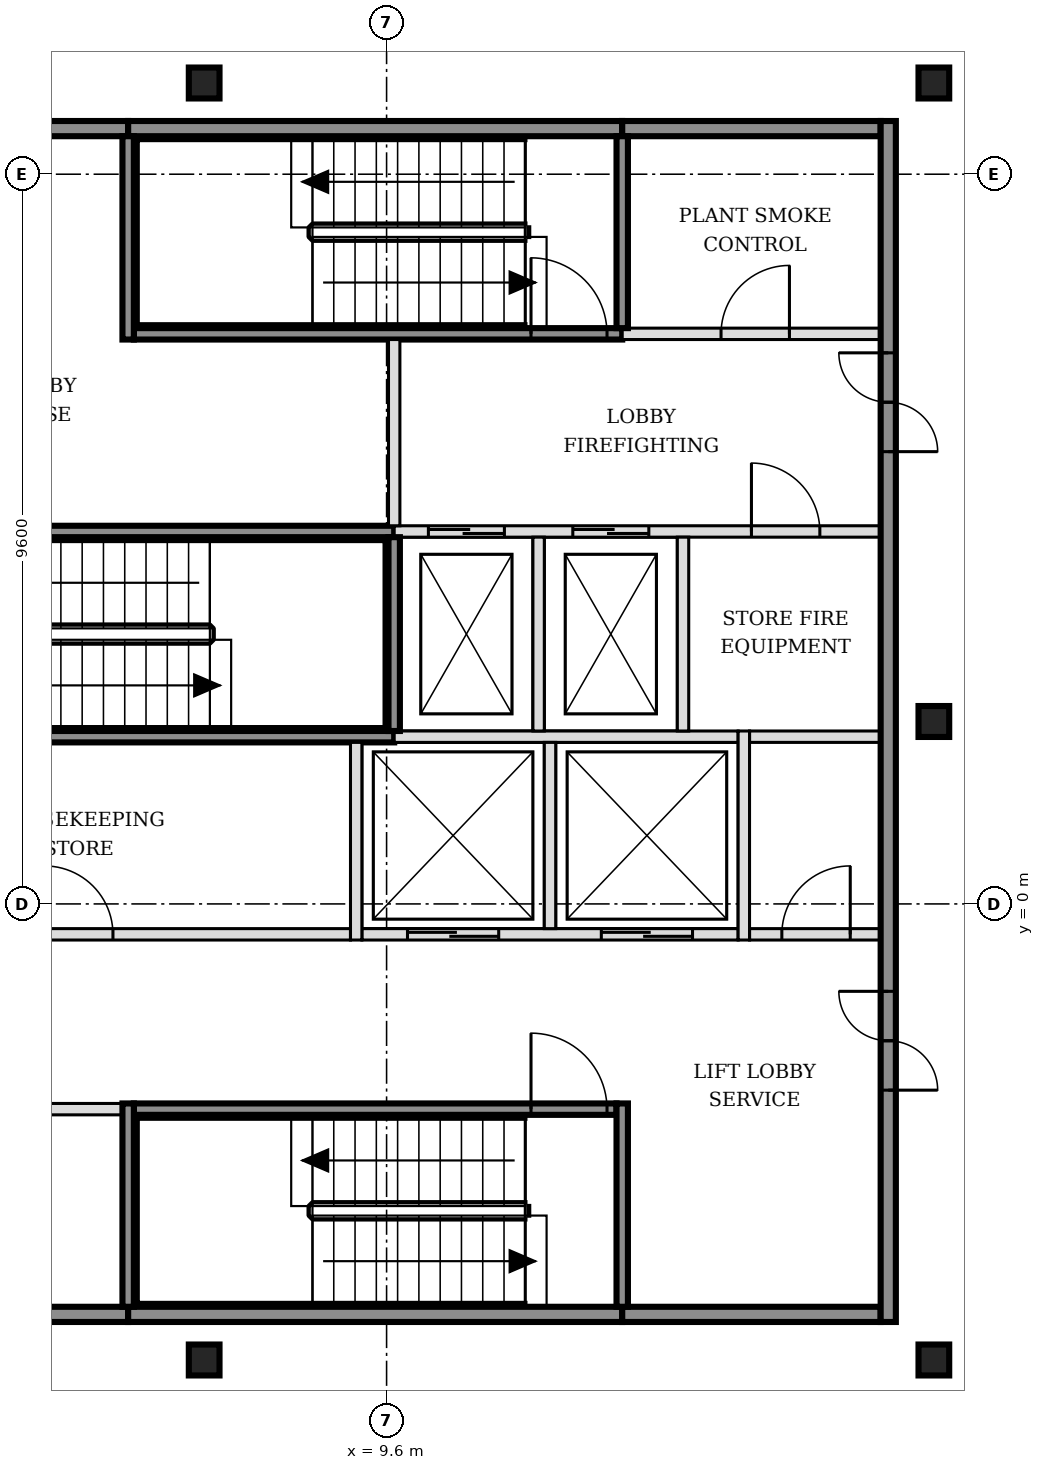
"""IFC4 building model, lengths in metres.
Left out: names, types, materials, properties, quantities, classifications, styles, units other than length and angle.
Written with IfcOpenShell. Run it as: python <this file> out.ifc"""

import sys

from ifc_helpers import new_model, si_unit, direction, frame, frame_2d, origin, origin_2d, place, context, subcontext, project, spatial, rectangle, i_section, extrude, element, fill, save


model = new_model("IFC4")
c1 = context("Model", 3, precision=1e-05, world=origin(), true_north=direction((0.0, 1.0)))
c2 = subcontext(c1, "Body", "Model", "MODEL_VIEW")
j1 = project(units=[si_unit("LENGTHUNIT", "METRE"), si_unit("PLANEANGLEUNIT", "RADIAN")], contexts=[c1])
p1 = place(None, origin())
s1 = spatial("IfcSite", under=j1, at=p1, CompositionType="ELEMENT")
p2 = place(p1, origin())
s2 = spatial("IfcBuilding", under=s1, at=p2, CompositionType="ELEMENT")
p3 = place(p2, frame((0.0, 0.0, 214.2)))
s3 = spatial("IfcBuildingStorey", under=s2, at=p3, CompositionType="ELEMENT", Elevation=214.2)
for number, where, z_axis, x_axis in (
    (1, (7.2, -6.0, -0.15), (0.0, 0.0, 1.0), (1.0, 0.0, 0.0)),
    (2, (16.8, -6.0, -0.15), (0.0, 0.0, 1.0), (1.0, 0.0, 0.0)),
    (3, (16.8, 2.4, -0.15), (0.0, 0.0, 1.0), (1.0, 0.0, 0.0)),
    (4, (7.2, 10.8, -0.15), (0.0, 0.0, 1.0), (1.0, 0.0, 0.0)),
    (5, (16.8, 10.8, -0.15), (0.0, 0.0, 1.0), (1.0, 0.0, 0.0)),
):
    element("IfcColumn", number, at=place(p3, frame(where, z_axis=z_axis, x_axis=x_axis)), inside=s3, PredefinedType="COLUMN", context=c2, shape_type="SweptSolid", body=[
        extrude(i_section(OverallWidth=0.404, OverallDepth=0.407, WebThickness=0.027, FlangeThickness=0.044, FilletRadius=0.015, at=origin_2d()), origin(), (0.0, 0.0, 1.0), 3.6),
    ])
p4 = place(p3, frame((-1.7, -5.4, 0.0), z_axis=(0.0, 0.0, 1.0), x_axis=(1.0, 0.0, 0.0)))
e6 = element("IfcWall", 6, at=p4, inside=s3, PredefinedType="SOLIDWALL", context=c2, shape_type="SweptSolid", body=[
    extrude(rectangle(XDim=7.9, YDim=0.2, at=frame_2d((3.95, 0.0))), origin(), (0.0, 0.0, 1.0), 3.45),
])
p5 = place(p3, frame((6.2, -5.4, 0.0), z_axis=(0.0, 0.0, 1.0), x_axis=(1.0, 0.0, 0.0)))
e7 = element("IfcWall", 7, at=p5, inside=s3, PredefinedType="SOLIDWALL", context=c2, shape_type="SweptSolid", body=[
    extrude(rectangle(XDim=6.5, YDim=0.2, at=frame_2d((3.25, 0.0))), origin(), (0.0, 0.0, 1.0), 3.45),
])
p6 = place(p3, frame((12.7, -5.4, 0.0), z_axis=(0.0, 0.0, 1.0), x_axis=(1.0, 0.0, 0.0)))
e8 = element("IfcWall", 8, at=p6, inside=s3, PredefinedType="SOLIDWALL", context=c2, shape_type="SweptSolid", body=[
    extrude(rectangle(XDim=3.4, YDim=0.2, at=frame_2d((1.7, 0.0))), origin(), (0.0, 0.0, 1.0), 3.45),
])
p7 = place(p3, frame((-1.7, -2.7, 0.0), z_axis=(0.0, 0.0, 1.0), x_axis=(1.0, 0.0, 0.0)))
e9 = element("IfcWall", 9, at=p7, inside=s3, PredefinedType="PARTITIONING", context=c2, shape_type="SweptSolid", body=[
    extrude(rectangle(XDim=7.825, YDim=0.15, at=frame_2d((3.913, 0.0))), origin(), (0.0, 0.0, 1.0), 3.45),
])
p8 = place(p7, frame((3.45, 0.0, 0.0)))
e10 = element("IfcOpeningElement", 10, at=p8, cuts=e9, PredefinedType="OPENING", context=c2, shape_type="SweptSolid", body=[
    extrude(rectangle(XDim=0.9, YDim=2.1, at=frame_2d((0.45, 1.05))), frame((0.0, 0.085, 0.0), z_axis=(0.0, -1.0, 0.0), x_axis=(1.0, 0.0, 0.0)), (0.0, 0.0, 1.0), 0.17),
])
p9 = place(p3, frame((6.275, -2.7, 0.0), z_axis=(0.0, 0.0, 1.0), x_axis=(1.0, 0.0, 0.0)))
e11 = element("IfcWall", 11, at=p9, inside=s3, PredefinedType="SOLIDWALL", context=c2, shape_type="SweptSolid", body=[
    extrude(rectangle(XDim=6.35, YDim=0.15, at=frame_2d((3.175, 0.0))), origin(), (0.0, 0.0, 1.0), 3.45),
])
p10 = place(p9, frame((5.225, 0.0, 0.0)))
e12 = element("IfcOpeningElement", 12, at=p10, cuts=e11, PredefinedType="OPENING", context=c2, shape_type="SweptSolid", body=[
    extrude(rectangle(XDim=1.0, YDim=2.1, at=frame_2d((0.5, 1.05))), frame((0.0, 0.085, 0.0), z_axis=(0.0, -1.0, 0.0), x_axis=(1.0, 0.0, 0.0)), (0.0, 0.0, 1.0), 0.17),
])
p11 = place(p3, frame((-1.7, -0.4, 0.0), z_axis=(0.0, 0.0, 1.0), x_axis=(1.0, 0.0, 0.0)))
e13 = element("IfcWall", 13, at=p11, inside=s3, PredefinedType="PARTITIONING", context=c2, shape_type="SweptSolid", body=[
    extrude(rectangle(XDim=10.825, YDim=0.15, at=frame_2d((5.413, 0.0))), origin(), (0.0, 0.0, 1.0), 3.45),
])
p12 = place(p11, frame((1.3, 0.0, 0.0)))
e14 = element("IfcOpeningElement", 14, at=p12, cuts=e13, PredefinedType="OPENING", context=c2, shape_type="SweptSolid", body=[
    extrude(rectangle(XDim=0.9, YDim=2.1, at=frame_2d((0.45, 1.05))), frame((0.0, 0.085, 0.0), z_axis=(0.0, -1.0, 0.0), x_axis=(1.0, 0.0, 0.0)), (0.0, 0.0, 1.0), 0.17),
])
p13 = place(p11, frame((6.8, 0.0, 0.0)))
e15 = element("IfcOpeningElement", 15, at=p13, cuts=e13, PredefinedType="OPENING", context=c2, shape_type="SweptSolid", body=[
    extrude(rectangle(XDim=0.9, YDim=2.1, at=frame_2d((0.45, 1.05))), frame((0.0, 0.085, 0.0), z_axis=(0.0, -1.0, 0.0), x_axis=(1.0, 0.0, 0.0)), (0.0, 0.0, 1.0), 0.17),
])
p14 = place(p3, frame((9.275, -0.4, 0.0), z_axis=(0.0, 0.0, 1.0), x_axis=(1.0, 0.0, 0.0)))
e16 = element("IfcWall", 16, at=p14, inside=s3, PredefinedType="SOLIDWALL", context=c2, shape_type="SweptSolid", body=[
    extrude(rectangle(XDim=4.95, YDim=0.15, at=frame_2d((2.475, 0.0))), origin(), (0.0, 0.0, 1.0), 3.45),
])
p15 = place(p14, frame((0.6, 0.0, 0.0)))
e17 = element("IfcOpeningElement", 17, at=p15, cuts=e16, PredefinedType="OPENING", context=c2, shape_type="SweptSolid", body=[
    extrude(rectangle(XDim=1.2, YDim=2.1, at=frame_2d((0.6, 1.05))), frame((0.0, 0.085, 0.0), z_axis=(0.0, -1.0, 0.0), x_axis=(1.0, 0.0, 0.0)), (0.0, 0.0, 1.0), 0.17),
])
p16 = place(p14, frame((3.15, 0.0, 0.0)))
e18 = element("IfcOpeningElement", 18, at=p16, cuts=e16, PredefinedType="OPENING", context=c2, shape_type="SweptSolid", body=[
    extrude(rectangle(XDim=1.2, YDim=2.1, at=frame_2d((0.6, 1.05))), frame((0.0, 0.085, 0.0), z_axis=(0.0, -1.0, 0.0), x_axis=(1.0, 0.0, 0.0)), (0.0, 0.0, 1.0), 0.17),
])
p17 = place(p3, frame((14.375, -0.4, 0.0), z_axis=(0.0, 0.0, 1.0), x_axis=(1.0, 0.0, 0.0)))
e19 = element("IfcWall", 19, at=p17, inside=s3, PredefinedType="PARTITIONING", context=c2, shape_type="SweptSolid", body=[
    extrude(rectangle(XDim=1.725, YDim=0.15, at=frame_2d((0.863, 0.0))), origin(), (0.0, 0.0, 1.0), 3.45),
])
p18 = place(p17, frame((0.425, 0.0, 0.0)))
e20 = element("IfcOpeningElement", 20, at=p18, cuts=e19, PredefinedType="OPENING", context=c2, shape_type="SweptSolid", body=[
    extrude(rectangle(XDim=0.9, YDim=2.1, at=frame_2d((0.45, 1.05))), frame((0.0, 0.085, 0.0), z_axis=(0.0, -1.0, 0.0), x_axis=(1.0, 0.0, 0.0)), (0.0, 0.0, 1.0), 0.17),
])
p19 = place(p3, frame((3.2, 2.2, 0.0), z_axis=(0.0, 0.0, 1.0), x_axis=(1.0, 0.0, 0.0)))
e21 = element("IfcWall", 21, at=p19, inside=s3, PredefinedType="SOLIDWALL", context=c2, shape_type="SweptSolid", body=[
    extrude(rectangle(XDim=6.5, YDim=0.15, at=frame_2d((3.25, 0.0))), origin(), (0.0, 0.0, 1.0), 3.45),
])
p20 = place(p3, frame((9.7, 2.2, 0.0), z_axis=(0.0, 0.0, 1.0), x_axis=(1.0, 0.0, 0.0)))
e22 = element("IfcWall", 22, at=p20, inside=s3, PredefinedType="SOLIDWALL", context=c2, shape_type="SweptSolid", body=[
    extrude(rectangle(XDim=4.525, YDim=0.15, at=frame_2d((2.263, 0.0))), origin(), (0.0, 0.0, 1.0), 3.45),
])
p21 = place(p3, frame((14.375, 2.2, 0.0), z_axis=(0.0, 0.0, 1.0), x_axis=(1.0, 0.0, 0.0)))
e23 = element("IfcWall", 23, at=p21, inside=s3, PredefinedType="PARTITIONING", context=c2, shape_type="SweptSolid", body=[
    extrude(rectangle(XDim=1.725, YDim=0.15, at=frame_2d((0.863, 0.0))), origin(), (0.0, 0.0, 1.0), 3.45),
])
p22 = place(p3, frame((3.2, 4.9, 0.0), z_axis=(0.0, 0.0, 1.0), x_axis=(1.0, 0.0, 0.0)))
e24 = element("IfcWall", 24, at=p22, inside=s3, PredefinedType="SOLIDWALL", context=c2, shape_type="SweptSolid", body=[
    extrude(rectangle(XDim=6.5, YDim=0.15, at=frame_2d((3.25, 0.0))), origin(), (0.0, 0.0, 1.0), 3.45),
])
p23 = place(p22, frame((0.175, 0.0, 0.0)))
e25 = element("IfcOpeningElement", 25, at=p23, cuts=e24, PredefinedType="OPENING", context=c2, shape_type="SweptSolid", body=[
    extrude(rectangle(XDim=1.0, YDim=2.1, at=frame_2d((0.5, 1.05))), frame((0.0, 0.085, 0.0), z_axis=(0.0, -1.0, 0.0), x_axis=(1.0, 0.0, 0.0)), (0.0, 0.0, 1.0), 0.17),
])
p24 = place(p3, frame((9.7, 4.9, 0.0), z_axis=(0.0, 0.0, 1.0), x_axis=(1.0, 0.0, 0.0)))
e26 = element("IfcWall", 26, at=p24, inside=s3, PredefinedType="SOLIDWALL", context=c2, shape_type="SweptSolid", body=[
    extrude(rectangle(XDim=6.4, YDim=0.15, at=frame_2d((3.2, 0.0))), origin(), (0.0, 0.0, 1.0), 3.45),
])
p25 = place(p24, frame((0.45, 0.0, 0.0)))
e27 = element("IfcOpeningElement", 27, at=p25, cuts=e26, PredefinedType="OPENING", context=c2, shape_type="SweptSolid", body=[
    extrude(rectangle(XDim=1.0, YDim=2.1, at=frame_2d((0.5, 1.05))), frame((0.0, 0.085, 0.0), z_axis=(0.0, -1.0, 0.0), x_axis=(1.0, 0.0, 0.0)), (0.0, 0.0, 1.0), 0.17),
])
p26 = place(p24, frame((2.35, 0.0, 0.0)))
e28 = element("IfcOpeningElement", 28, at=p26, cuts=e26, PredefinedType="OPENING", context=c2, shape_type="SweptSolid", body=[
    extrude(rectangle(XDim=1.0, YDim=2.1, at=frame_2d((0.5, 1.05))), frame((0.0, 0.085, 0.0), z_axis=(0.0, -1.0, 0.0), x_axis=(1.0, 0.0, 0.0)), (0.0, 0.0, 1.0), 0.17),
])
p27 = place(p24, frame((4.7, 0.0, 0.0)))
e29 = element("IfcOpeningElement", 29, at=p27, cuts=e26, PredefinedType="OPENING", context=c2, shape_type="SweptSolid", body=[
    extrude(rectangle(XDim=0.9, YDim=2.1, at=frame_2d((0.45, 1.05))), frame((0.0, 0.085, 0.0), z_axis=(0.0, -1.0, 0.0), x_axis=(1.0, 0.0, 0.0)), (0.0, 0.0, 1.0), 0.17),
])
p28 = place(p3, frame((6.275, 7.5, 0.0), z_axis=(0.0, 0.0, 1.0), x_axis=(1.0, 0.0, 0.0)))
e30 = element("IfcWall", 30, at=p28, inside=s3, PredefinedType="SOLIDWALL", context=c2, shape_type="SweptSolid", body=[
    extrude(rectangle(XDim=6.425, YDim=0.15, at=frame_2d((3.212, 0.0))), origin(), (0.0, 0.0, 1.0), 3.45),
])
p29 = place(p28, frame((5.225, 0.0, 0.0)))
e31 = element("IfcOpeningElement", 31, at=p29, cuts=e30, PredefinedType="OPENING", context=c2, shape_type="SweptSolid", body=[
    extrude(rectangle(XDim=1.0, YDim=2.1, at=frame_2d((0.5, 1.05))), frame((0.0, 0.085, 0.0), z_axis=(0.0, -1.0, 0.0), x_axis=(1.0, 0.0, 0.0)), (0.0, 0.0, 1.0), 0.17),
])
p30 = place(p3, frame((12.7, 7.5, 0.0), z_axis=(0.0, 0.0, 1.0), x_axis=(1.0, 0.0, 0.0)))
e32 = element("IfcWall", 32, at=p30, inside=s3, PredefinedType="SOLIDWALL", context=c2, shape_type="SweptSolid", body=[
    extrude(rectangle(XDim=3.4, YDim=0.15, at=frame_2d((1.7, 0.0))), origin(), (0.0, 0.0, 1.0), 3.45),
])
p31 = place(p30, frame((1.3, 0.0, 0.0)))
e33 = element("IfcOpeningElement", 33, at=p31, cuts=e32, PredefinedType="OPENING", context=c2, shape_type="SweptSolid", body=[
    extrude(rectangle(XDim=0.9, YDim=2.1, at=frame_2d((0.45, 1.05))), frame((0.0, 0.085, 0.0), z_axis=(0.0, -1.0, 0.0), x_axis=(1.0, 0.0, 0.0)), (0.0, 0.0, 1.0), 0.17),
])
p32 = place(p3, frame((-1.7, 10.2, 0.0), z_axis=(0.0, 0.0, 1.0), x_axis=(1.0, 0.0, 0.0)))
e34 = element("IfcWall", 34, at=p32, inside=s3, PredefinedType="SOLIDWALL", context=c2, shape_type="SweptSolid", body=[
    extrude(rectangle(XDim=7.9, YDim=0.2, at=frame_2d((3.95, 0.0))), origin(), (0.0, 0.0, 1.0), 3.45),
])
p33 = place(p3, frame((6.2, 10.2, 0.0), z_axis=(0.0, 0.0, 1.0), x_axis=(1.0, 0.0, 0.0)))
e35 = element("IfcWall", 35, at=p33, inside=s3, PredefinedType="SOLIDWALL", context=c2, shape_type="SweptSolid", body=[
    extrude(rectangle(XDim=6.5, YDim=0.2, at=frame_2d((3.25, 0.0))), origin(), (0.0, 0.0, 1.0), 3.45),
])
p34 = place(p3, frame((12.7, 10.2, 0.0), z_axis=(0.0, 0.0, 1.0), x_axis=(1.0, 0.0, 0.0)))
e36 = element("IfcWall", 36, at=p34, inside=s3, PredefinedType="SOLIDWALL", context=c2, shape_type="SweptSolid", body=[
    extrude(rectangle(XDim=3.4, YDim=0.2, at=frame_2d((1.7, 0.0))), origin(), (0.0, 0.0, 1.0), 3.45),
])
for number, where, z_axis, x_axis in (
    (37, (6.2, -5.3, 0.0), (0.0, 0.0, 1.0), (0.0, 1.0, 0.0)),
    (38, (6.2, 7.425, 0.0), (0.0, 0.0, 1.0), (0.0, 1.0, 0.0)),
):
    element("IfcWall", number, at=place(p3, frame(where, z_axis=z_axis, x_axis=x_axis)), inside=s3, PredefinedType="SOLIDWALL", context=c2, shape_type="SweptSolid", body=[
        extrude(rectangle(XDim=2.675, YDim=0.15, at=frame_2d((1.337, 0.0))), origin(), (0.0, 0.0, 1.0), 3.45),
    ])
p35 = place(p3, frame((9.2, -0.475, 0.0), z_axis=(0.0, 0.0, 1.0), x_axis=(0.0, 1.0, 0.0)))
e39 = element("IfcWall", 39, at=p35, inside=s3, PredefinedType="SOLIDWALL", context=c2, shape_type="SweptSolid", body=[
    extrude(rectangle(XDim=2.6, YDim=0.15, at=frame_2d((1.3, 0.0))), origin(), (0.0, 0.0, 1.0), 3.45),
])
p36 = place(p3, frame((9.7, 2.275, 0.0), z_axis=(0.0, 0.0, 1.0), x_axis=(0.0, 1.0, 0.0)))
e40 = element("IfcWall", 40, at=p36, inside=s3, PredefinedType="SOLIDWALL", context=c2, shape_type="SweptSolid", body=[
    extrude(rectangle(XDim=2.55, YDim=0.15, at=frame_2d((1.275, 0.0))), origin(), (0.0, 0.0, 1.0), 3.45),
])
p37 = place(p3, frame((9.7, 4.975, 0.0), z_axis=(0.0, 0.0, 1.0), x_axis=(0.0, 1.0, 0.0)))
e41 = element("IfcWall", 41, at=p37, inside=s3, PredefinedType="SOLIDWALL", context=c2, shape_type="SweptSolid", body=[
    extrude(rectangle(XDim=2.45, YDim=0.15, at=frame_2d((1.225, 0.0))), origin(), (0.0, 0.0, 1.0), 3.45),
])
p38 = place(p3, frame((11.6, 2.275, 0.0), z_axis=(0.0, 0.0, 1.0), x_axis=(0.0, 1.0, 0.0)))
e42 = element("IfcWall", 42, at=p38, inside=s3, PredefinedType="SOLIDWALL", context=c2, shape_type="SweptSolid", body=[
    extrude(rectangle(XDim=2.55, YDim=0.15, at=frame_2d((1.275, 0.0))), origin(), (0.0, 0.0, 1.0), 3.45),
])
p39 = place(p3, frame((11.75, -0.325, 0.0), z_axis=(0.0, 0.0, 1.0), x_axis=(0.0, 1.0, 0.0)))
e43 = element("IfcWall", 43, at=p39, inside=s3, PredefinedType="SOLIDWALL", context=c2, shape_type="SweptSolid", body=[
    extrude(rectangle(XDim=2.45, YDim=0.15, at=frame_2d((1.225, 0.0))), origin(), (0.0, 0.0, 1.0), 3.45),
])
p40 = place(p3, frame((12.7, -5.3, 0.0), z_axis=(0.0, 0.0, 1.0), x_axis=(0.0, 1.0, 0.0)))
e44 = element("IfcWall", 44, at=p40, inside=s3, PredefinedType="SOLIDWALL", context=c2, shape_type="SweptSolid", body=[
    extrude(rectangle(XDim=2.675, YDim=0.15, at=frame_2d((1.337, 0.0))), origin(), (0.0, 0.0, 1.0), 3.45),
])
p41 = place(p3, frame((12.7, 7.575, 0.0), z_axis=(0.0, 0.0, 1.0), x_axis=(0.0, 1.0, 0.0)))
e45 = element("IfcWall", 45, at=p41, inside=s3, PredefinedType="SOLIDWALL", context=c2, shape_type="SweptSolid", body=[
    extrude(rectangle(XDim=2.525, YDim=0.15, at=frame_2d((1.263, 0.0))), origin(), (0.0, 0.0, 1.0), 3.45),
])
p42 = place(p3, frame((13.5, 2.275, 0.0), z_axis=(0.0, 0.0, 1.0), x_axis=(0.0, 1.0, 0.0)))
e46 = element("IfcWall", 46, at=p42, inside=s3, PredefinedType="SOLIDWALL", context=c2, shape_type="SweptSolid", body=[
    extrude(rectangle(XDim=2.55, YDim=0.15, at=frame_2d((1.275, 0.0))), origin(), (0.0, 0.0, 1.0), 3.45),
])
p43 = place(p3, frame((14.3, -0.475, 0.0), z_axis=(0.0, 0.0, 1.0), x_axis=(0.0, 1.0, 0.0)))
e47 = element("IfcWall", 47, at=p43, inside=s3, PredefinedType="SOLIDWALL", context=c2, shape_type="SweptSolid", body=[
    extrude(rectangle(XDim=2.75, YDim=0.15, at=frame_2d((1.375, 0.0))), origin(), (0.0, 0.0, 1.0), 3.45),
])
p44 = place(p3, frame((16.2, -5.5, 0.0), z_axis=(0.0, 0.0, 1.0), x_axis=(0.0, 1.0, 0.0)))
e48 = element("IfcWall", 48, at=p44, inside=s3, PredefinedType="SOLIDWALL", context=c2, shape_type="SweptSolid", body=[
    extrude(rectangle(XDim=15.8, YDim=0.2, at=frame_2d((7.9, 0.0))), origin(), (0.0, 0.0, 1.0), 3.45),
])
p45 = place(p44, frame((3.05, 0.0, 0.0)))
e49 = element("IfcOpeningElement", 49, at=p45, cuts=e48, PredefinedType="OPENING", context=c2, shape_type="SweptSolid", body=[
    extrude(rectangle(XDim=1.3, YDim=2.1, at=frame_2d((0.65, 1.05))), frame((0.0, 0.11, 0.0), z_axis=(0.0, -1.0, 0.0), x_axis=(1.0, 0.0, 0.0)), (0.0, 0.0, 1.0), 0.22),
])
p46 = place(p44, frame((11.45, 0.0, 0.0)))
e50 = element("IfcOpeningElement", 50, at=p46, cuts=e48, PredefinedType="OPENING", context=c2, shape_type="SweptSolid", body=[
    extrude(rectangle(XDim=1.3, YDim=2.1, at=frame_2d((0.65, 1.05))), frame((0.0, 0.11, 0.0), z_axis=(0.0, -1.0, 0.0), x_axis=(1.0, 0.0, 0.0)), (0.0, 0.0, 1.0), 0.22),
])
p47 = place(p15, origin())
e51 = element("IfcDoor", 51, at=p47, inside=s3, OperationType="DOUBLE_DOOR_SLIDING", PredefinedType="DOOR", context=c2, shape_type="SweptSolid", body=[
    extrude(rectangle(XDim=1.2, YDim=2.1, at=frame_2d((0.6, 1.05))), frame((0.0, 0.025, 0.0), z_axis=(0.0, -1.0, 0.0), x_axis=(1.0, 0.0, 0.0)), (0.0, 0.0, 1.0), 0.05),
])
fill(e17, e51)
p48 = place(p16, origin())
e52 = element("IfcDoor", 52, at=p48, inside=s3, OperationType="DOUBLE_DOOR_SLIDING", PredefinedType="DOOR", context=c2, shape_type="SweptSolid", body=[
    extrude(rectangle(XDim=1.2, YDim=2.1, at=frame_2d((0.6, 1.05))), frame((0.0, 0.025, 0.0), z_axis=(0.0, -1.0, 0.0), x_axis=(1.0, 0.0, 0.0)), (0.0, 0.0, 1.0), 0.05),
])
fill(e18, e52)
p49 = place(p25, origin())
e53 = element("IfcDoor", 53, at=p49, inside=s3, OperationType="DOUBLE_DOOR_SLIDING", PredefinedType="DOOR", context=c2, shape_type="SweptSolid", body=[
    extrude(rectangle(XDim=1.0, YDim=2.1, at=frame_2d((0.5, 1.05))), frame((0.0, 0.025, 0.0), z_axis=(0.0, -1.0, 0.0), x_axis=(1.0, 0.0, 0.0)), (0.0, 0.0, 1.0), 0.05),
])
fill(e27, e53)
p50 = place(p26, origin())
e54 = element("IfcDoor", 54, at=p50, inside=s3, OperationType="DOUBLE_DOOR_SLIDING", PredefinedType="DOOR", context=c2, shape_type="SweptSolid", body=[
    extrude(rectangle(XDim=1.0, YDim=2.1, at=frame_2d((0.5, 1.05))), frame((0.0, 0.025, 0.0), z_axis=(0.0, -1.0, 0.0), x_axis=(1.0, 0.0, 0.0)), (0.0, 0.0, 1.0), 0.05),
])
fill(e28, e54)
p51 = place(p10, origin())
e55 = element("IfcDoor", 55, at=p51, inside=s3, OperationType="SINGLE_SWING_LEFT", PredefinedType="DOOR", context=c2, shape_type="SweptSolid", body=[
    extrude(rectangle(XDim=1.0, YDim=2.1, at=frame_2d((0.5, 1.05))), frame((0.0, 0.025, 0.0), z_axis=(0.0, -1.0, 0.0), x_axis=(1.0, 0.0, 0.0)), (0.0, 0.0, 1.0), 0.05),
])
fill(e12, e55)
p52 = place(p29, origin())
e56 = element("IfcDoor", 56, at=p52, inside=s3, OperationType="SINGLE_SWING_LEFT", PredefinedType="DOOR", context=c2, shape_type="SweptSolid", body=[
    extrude(rectangle(XDim=1.0, YDim=2.1, at=frame_2d((0.5, 1.05))), frame((0.0, 0.025, 0.0), z_axis=(0.0, -1.0, 0.0), x_axis=(1.0, 0.0, 0.0)), (0.0, 0.0, 1.0), 0.05),
])
fill(e31, e56)
p53 = place(p45, origin())
e57 = element("IfcDoor", 57, at=p53, inside=s3, OperationType="DOUBLE_DOOR_SINGLE_SWING", PredefinedType="DOOR", context=c2, shape_type="SweptSolid", body=[
    extrude(rectangle(XDim=1.3, YDim=2.1, at=frame_2d((0.65, 1.05))), frame((0.0, 0.025, 0.0), z_axis=(0.0, -1.0, 0.0), x_axis=(1.0, 0.0, 0.0)), (0.0, 0.0, 1.0), 0.05),
])
fill(e49, e57)
p54 = place(p46, origin())
e58 = element("IfcDoor", 58, at=p54, inside=s3, OperationType="DOUBLE_DOOR_SINGLE_SWING", PredefinedType="DOOR", context=c2, shape_type="SweptSolid", body=[
    extrude(rectangle(XDim=1.3, YDim=2.1, at=frame_2d((0.65, 1.05))), frame((0.0, 0.025, 0.0), z_axis=(0.0, -1.0, 0.0), x_axis=(1.0, 0.0, 0.0)), (0.0, 0.0, 1.0), 0.05),
])
fill(e50, e58)
p55 = place(p18, origin())
e59 = element("IfcDoor", 59, at=p55, inside=s3, OperationType="SINGLE_SWING_RIGHT", PredefinedType="DOOR", context=c2, shape_type="SweptSolid", body=[
    extrude(rectangle(XDim=0.9, YDim=2.1, at=frame_2d((0.45, 1.05))), frame((0.0, 0.025, 0.0), z_axis=(0.0, -1.0, 0.0), x_axis=(1.0, 0.0, 0.0)), (0.0, 0.0, 1.0), 0.05),
])
fill(e20, e59)
p56 = place(p27, origin())
e60 = element("IfcDoor", 60, at=p56, inside=s3, OperationType="SINGLE_SWING_LEFT", PredefinedType="DOOR", context=c2, shape_type="SweptSolid", body=[
    extrude(rectangle(XDim=0.9, YDim=2.1, at=frame_2d((0.45, 1.05))), frame((0.0, 0.025, 0.0), z_axis=(0.0, -1.0, 0.0), x_axis=(1.0, 0.0, 0.0)), (0.0, 0.0, 1.0), 0.05),
])
fill(e29, e60)
p57 = place(p31, origin())
e61 = element("IfcDoor", 61, at=p57, inside=s3, OperationType="SINGLE_SWING_RIGHT", PredefinedType="DOOR", context=c2, shape_type="SweptSolid", body=[
    extrude(rectangle(XDim=0.9, YDim=2.1, at=frame_2d((0.45, 1.05))), frame((0.0, 0.025, 0.0), z_axis=(0.0, -1.0, 0.0), x_axis=(1.0, 0.0, 0.0)), (0.0, 0.0, 1.0), 0.05),
])
fill(e33, e61)
p58 = place(p13, origin())
e62 = element("IfcDoor", 62, at=p58, inside=s3, OperationType="SINGLE_SWING_LEFT", PredefinedType="DOOR", context=c2, shape_type="SweptSolid", body=[
    extrude(rectangle(XDim=0.9, YDim=2.1, at=frame_2d((0.45, 1.05))), frame((0.0, 0.025, 0.0), z_axis=(0.0, -1.0, 0.0), x_axis=(1.0, 0.0, 0.0)), (0.0, 0.0, 1.0), 0.05),
])
fill(e15, e62)
save(model, sys.argv[1])
